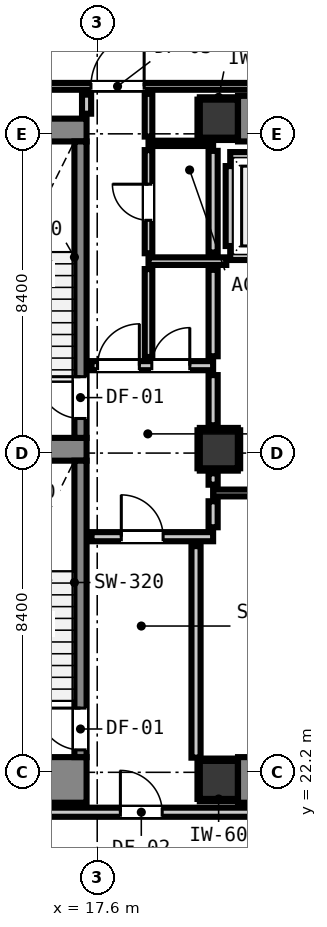
"""IFC4 building model, lengths in metres.
Left out: names, types, materials, properties, quantities, classifications, styles, units other than length and angle.
Written with IfcOpenShell. Run it as: python <this file> out.ifc"""

import sys

from ifc_helpers import new_model, si_unit, direction, frame, frame_2d, origin, origin_2d, place, context, subcontext, project, spatial, rectangle, extrude, element, fill, save


model = new_model("IFC4")
c1 = context("Model", 3, precision=1e-05, world=origin(), true_north=direction((0.0, 1.0)))
c2 = subcontext(c1, "Body", "Model", "MODEL_VIEW")
j1 = project(units=[si_unit("LENGTHUNIT", "METRE"), si_unit("PLANEANGLEUNIT", "RADIAN")], contexts=[c1])
p1 = place(None, origin())
s1 = spatial("IfcSite", under=j1, at=p1, CompositionType="ELEMENT")
p2 = place(p1, origin())
s2 = spatial("IfcBuilding", under=s1, at=p2, CompositionType="ELEMENT")
p3 = place(p2, frame((0.0, 0.0, 17.8)))
s3 = spatial("IfcBuildingStorey", under=s2, at=p3, CompositionType="ELEMENT", Elevation=17.8)
for number, where, z_axis, x_axis in (
    (1, (20.8, 22.0, 0.0), (0.0, 0.0, 1.0), (1.0, 0.0, 0.0)),
    (2, (20.8, 39.4, 0.0), (0.0, 0.0, 1.0), (1.0, 0.0, 0.0)),
):
    element("IfcColumn", number, at=place(p3, frame(where, z_axis=z_axis, x_axis=x_axis)), inside=s3, PredefinedType="COLUMN", context=c2, shape_type="SweptSolid", body=[
        extrude(rectangle(XDim=1.0, YDim=1.0, at=origin_2d()), origin(), (0.0, 0.0, 1.0), 4.2),
    ])
p4 = place(p3, frame((13.24, 22.0, 0.0), z_axis=(0.0, 0.0, 1.0), x_axis=(1.0, 0.0, 0.0)))
e3 = element("IfcWall", 3, at=p4, inside=s3, PredefinedType="SHEAR", context=c2, shape_type="SweptSolid", body=[
    extrude(rectangle(XDim=4.08, YDim=1.2, at=frame_2d((2.04, 0.0))), origin(), (0.0, 0.0, 1.0), 4.2),
])
p5 = place(p3, frame((13.24, 39.1, 0.0), z_axis=(0.0, 0.0, 1.0), x_axis=(1.0, 0.0, 0.0)))
e4 = element("IfcWall", 4, at=p5, inside=s3, PredefinedType="SHEAR", context=c2, shape_type="SweptSolid", body=[
    extrude(rectangle(XDim=4.08, YDim=0.6, at=frame_2d((2.04, 0.0))), origin(), (0.0, 0.0, 1.0), 4.2),
])
p6 = place(p3, frame((13.905, 30.7, 0.0), z_axis=(0.0, 0.0, 1.0), x_axis=(1.0, 0.0, 0.0)))
e5 = element("IfcWall", 5, at=p6, inside=s3, PredefinedType="SHEAR", context=c2, shape_type="SweptSolid", body=[
    extrude(rectangle(XDim=3.415, YDim=0.6, at=frame_2d((1.708, 0.0))), origin(), (0.0, 0.0, 1.0), 4.2),
])
for number, where, z_axis, x_axis in (
    (6, (21.305, 22.0, 0.0), (0.0, 0.0, 1.0), (1.0, 0.0, 0.0)),
    (7, (21.305, 39.4, 0.0), (0.0, 0.0, 1.0), (1.0, 0.0, 0.0)),
):
    element("IfcWall", number, at=place(p3, frame(where, z_axis=z_axis, x_axis=x_axis)), inside=s3, PredefinedType="SHEAR", context=c2, shape_type="SweptSolid", body=[
        extrude(rectangle(XDim=7.39, YDim=1.2, at=frame_2d((3.695, 0.0))), origin(), (0.0, 0.0, 1.0), 4.2),
    ])
p7 = place(p3, frame((17.16, 31.0, 0.0), z_axis=(0.0, 0.0, 1.0), x_axis=(0.0, 1.0, 0.0)))
e8 = element("IfcWall", 8, at=p7, inside=s3, PredefinedType="SHEAR", context=c2, shape_type="SweptSolid", body=[
    extrude(rectangle(XDim=7.8, YDim=0.32, at=frame_2d((3.9, 0.0))), origin(), (0.0, 0.0, 1.0), 4.2),
])
p8 = place(p7, frame((0.51, 0.0, 0.0)))
e9 = element("IfcOpeningElement", 9, at=p8, cuts=e8, PredefinedType="OPENING", context=c2, shape_type="SweptSolid", body=[
    extrude(rectangle(XDim=1.1, YDim=2.15, at=frame_2d((0.55, 1.075))), frame((0.0, 0.17, 0.0), z_axis=(0.0, -1.0, 0.0), x_axis=(1.0, 0.0, 0.0)), (0.0, 0.0, 1.0), 0.34),
])
p9 = place(p3, frame((17.16, 22.6, 0.0), z_axis=(0.0, 0.0, 1.0), x_axis=(0.0, 1.0, 0.0)))
e10 = element("IfcWall", 10, at=p9, inside=s3, PredefinedType="SHEAR", context=c2, shape_type="SweptSolid", body=[
    extrude(rectangle(XDim=7.8, YDim=0.32, at=frame_2d((3.9, 0.0))), origin(), (0.0, 0.0, 1.0), 4.2),
])
p10 = place(p9, frame((0.19, 0.0, 0.0)))
e11 = element("IfcOpeningElement", 11, at=p10, cuts=e10, PredefinedType="OPENING", context=c2, shape_type="SweptSolid", body=[
    extrude(rectangle(XDim=1.1, YDim=2.15, at=frame_2d((0.55, 1.075))), frame((0.0, 0.17, 0.0), z_axis=(0.0, -1.0, 0.0), x_axis=(1.0, 0.0, 0.0)), (0.0, 0.0, 1.0), 0.34),
])
p11 = place(p3, frame((20.8, 30.7, 0.0), z_axis=(0.0, 0.0, 1.0), x_axis=(1.0, 0.0, 0.0)))
e12 = element("IfcColumn", 12, at=p11, inside=s3, PredefinedType="COLUMN", context=c2, shape_type="SweptSolid", body=[
    extrude(rectangle(XDim=1.0, YDim=1.0, at=origin_2d()), origin(), (0.0, 0.0, 1.0), 4.2),
])
for number, where, z_axis, x_axis in (
    (13, (21.1, 35.8, 0.0), (0.0, 0.0, 1.0), (1.0, 0.0, 0.0)),
    (14, (21.1, 38.4, 0.0), (0.0, 0.0, 1.0), (1.0, 0.0, 0.0)),
):
    element("IfcWall", number, at=place(p3, frame(where, z_axis=z_axis, x_axis=x_axis)), inside=s3, PredefinedType="PARTITIONING", context=c2, shape_type="SweptSolid", body=[
        extrude(rectangle(XDim=2.2, YDim=0.24, at=frame_2d((1.1, 0.0))), origin(), (0.0, 0.0, 1.0), 3.78),
    ])
p12 = place(p3, frame((21.1, 36.048, 0.0), z_axis=(0.0, 0.0, 1.0), x_axis=(0.0, 1.0, 0.0)))
e15 = element("IfcWall", 15, at=p12, inside=s3, PredefinedType="PARTITIONING", context=c2, shape_type="SweptSolid", body=[
    extrude(rectangle(XDim=2.104, YDim=0.24, at=frame_2d((1.052, 0.0))), origin(), (0.0, 0.0, 1.0), 1.785),
])
p13 = place(p3, frame((10.5, 21.15, 0.0), z_axis=(0.0, 0.0, 1.0), x_axis=(1.0, 0.0, 0.0)))
e16 = element("IfcWall", 16, at=p13, inside=s3, PredefinedType="PARTITIONING", context=c2, shape_type="SweptSolid", body=[
    extrude(rectangle(XDim=28.7, YDim=0.24, at=frame_2d((14.35, 0.0))), origin(), (0.0, 0.0, 1.0), 3.78),
])
p14 = place(p13, frame((7.71, 0.0, 0.0)))
e17 = element("IfcOpeningElement", 17, at=p14, cuts=e16, PredefinedType="OPENING", context=c2, shape_type="SweptSolid", body=[
    extrude(rectangle(XDim=1.1, YDim=2.15, at=frame_2d((0.55, 1.075))), frame((0.0, 0.13, 0.0), z_axis=(0.0, -1.0, 0.0), x_axis=(1.0, 0.0, 0.0)), (0.0, 0.0, 1.0), 0.26),
])
p15 = place(p13, frame((0.324, 0.0, 0.0)))
e18 = element("IfcOpeningElement", 18, at=p15, cuts=e16, PredefinedType="OPENING", context=c2, shape_type="SweptSolid", body=[
    extrude(rectangle(XDim=1.4, YDim=2.15, at=frame_2d((0.7, 1.075))), frame((0.0, 0.13, 0.0), z_axis=(0.0, -1.0, 0.0), x_axis=(1.0, 0.0, 0.0)), (0.0, 0.0, 1.0), 0.26),
])
p16 = place(p13, frame((27.026, 0.0, 0.0)))
e19 = element("IfcOpeningElement", 19, at=p16, cuts=e16, PredefinedType="OPENING", context=c2, shape_type="SweptSolid", body=[
    extrude(rectangle(XDim=1.4, YDim=2.15, at=frame_2d((0.7, 1.075))), frame((0.0, 0.13, 0.0), z_axis=(0.0, -1.0, 0.0), x_axis=(1.0, 0.0, 0.0)), (0.0, 0.0, 1.0), 0.26),
])
p17 = place(p3, frame((17.45, 28.4, 0.0), z_axis=(0.0, 0.0, 1.0), x_axis=(1.0, 0.0, 0.0)))
e20 = element("IfcWall", 20, at=p17, inside=s3, PredefinedType="PARTITIONING", context=c2, shape_type="SweptSolid", body=[
    extrude(rectangle(XDim=3.2, YDim=0.24, at=frame_2d((1.6, 0.0))), origin(), (0.0, 0.0, 1.0), 3.78),
])
p18 = place(p17, frame((0.784, 0.0, 0.0)))
e21 = element("IfcOpeningElement", 21, at=p18, cuts=e20, PredefinedType="OPENING", context=c2, shape_type="SweptSolid", body=[
    extrude(rectangle(XDim=1.1, YDim=2.15, at=frame_2d((0.55, 1.075))), frame((0.0, 0.13, 0.0), z_axis=(0.0, -1.0, 0.0), x_axis=(1.0, 0.0, 0.0)), (0.0, 0.0, 1.0), 0.26),
])
p19 = place(p3, frame((17.45, 32.9, 0.0), z_axis=(0.0, 0.0, 1.0), x_axis=(1.0, 0.0, 0.0)))
e22 = element("IfcWall", 22, at=p19, inside=s3, PredefinedType="PARTITIONING", context=c2, shape_type="SweptSolid", body=[
    extrude(rectangle(XDim=3.2, YDim=0.24, at=frame_2d((1.6, 0.0))), origin(), (0.0, 0.0, 1.0), 3.78),
])
p20 = place(p19, frame((0.159, 0.0, 0.0)))
e23 = element("IfcOpeningElement", 23, at=p20, cuts=e22, PredefinedType="OPENING", context=c2, shape_type="SweptSolid", body=[
    extrude(rectangle(XDim=1.1, YDim=2.15, at=frame_2d((0.55, 1.075))), frame((0.0, 0.13, 0.0), z_axis=(0.0, -1.0, 0.0), x_axis=(1.0, 0.0, 0.0)), (0.0, 0.0, 1.0), 0.26),
])
p21 = place(p19, frame((1.586, 0.0, 0.0)))
e24 = element("IfcOpeningElement", 24, at=p21, cuts=e22, PredefinedType="OPENING", context=c2, shape_type="SweptSolid", body=[
    extrude(rectangle(XDim=1.0, YDim=2.15, at=frame_2d((0.5, 1.075))), frame((0.0, 0.13, 0.0), z_axis=(0.0, -1.0, 0.0), x_axis=(1.0, 0.0, 0.0)), (0.0, 0.0, 1.0), 0.26),
])
p22 = place(p3, frame((18.95, 35.65, 0.0), z_axis=(0.0, 0.0, 1.0), x_axis=(1.0, 0.0, 0.0)))
e25 = element("IfcWall", 25, at=p22, inside=s3, PredefinedType="PARTITIONING", context=c2, shape_type="SweptSolid", body=[
    extrude(rectangle(XDim=2.046, YDim=0.2, at=frame_2d((1.023, 0.0))), origin(), (0.0, 0.0, 1.0), 3.78),
])
p23 = place(p3, frame((20.65, 29.55, 0.0), z_axis=(0.0, 0.0, 1.0), x_axis=(1.0, 0.0, 0.0)))
e26 = element("IfcWall", 26, at=p23, inside=s3, PredefinedType="PARTITIONING", context=c2, shape_type="SweptSolid", body=[
    extrude(rectangle(XDim=9.325, YDim=0.18, at=frame_2d((4.663, 0.0))), origin(), (0.0, 0.0, 1.0), 3.78),
])
p24 = place(p3, frame((10.5, 40.25, 0.0), z_axis=(0.0, 0.0, 1.0), x_axis=(1.0, 0.0, 0.0)))
e27 = element("IfcWall", 27, at=p24, inside=s3, PredefinedType="PARTITIONING", context=c2, shape_type="SweptSolid", body=[
    extrude(rectangle(XDim=37.2, YDim=0.18, at=frame_2d((18.6, 0.0))), origin(), (0.0, 0.0, 1.0), 3.78),
])
p25 = place(p24, frame((6.935, 0.0, 0.0)))
e28 = element("IfcOpeningElement", 28, at=p25, cuts=e27, PredefinedType="OPENING", context=c2, shape_type="SweptSolid", body=[
    extrude(rectangle(XDim=1.4, YDim=2.15, at=frame_2d((0.7, 1.075))), frame((0.0, 0.1, 0.0), z_axis=(0.0, -1.0, 0.0), x_axis=(1.0, 0.0, 0.0)), (0.0, 0.0, 1.0), 0.2),
])
p26 = place(p24, frame((0.324, 0.0, 0.0)))
e29 = element("IfcOpeningElement", 29, at=p26, cuts=e27, PredefinedType="OPENING", context=c2, shape_type="SweptSolid", body=[
    extrude(rectangle(XDim=1.4, YDim=2.15, at=frame_2d((0.7, 1.075))), frame((0.0, 0.1, 0.0), z_axis=(0.0, -1.0, 0.0), x_axis=(1.0, 0.0, 0.0)), (0.0, 0.0, 1.0), 0.2),
])
p27 = place(p24, frame((27.05, 0.0, 0.0)))
e30 = element("IfcOpeningElement", 30, at=p27, cuts=e27, PredefinedType="OPENING", context=c2, shape_type="SweptSolid", body=[
    extrude(rectangle(XDim=1.4, YDim=2.15, at=frame_2d((0.7, 1.075))), frame((0.0, 0.1, 0.0), z_axis=(0.0, -1.0, 0.0), x_axis=(1.0, 0.0, 0.0)), (0.0, 0.0, 1.0), 0.2),
])
p28 = place(p3, frame((18.95, 38.75, 0.0), z_axis=(0.0, 0.0, 1.0), x_axis=(1.0, 0.0, 0.0)))
e31 = element("IfcWall", 31, at=p28, inside=s3, PredefinedType="PARTITIONING", context=c2, shape_type="SweptSolid", body=[
    extrude(rectangle(XDim=1.7, YDim=0.14, at=frame_2d((0.85, 0.0))), origin(), (0.0, 0.0, 1.0), 1.785),
])
p29 = place(p3, frame((17.32, 39.53, 0.0), z_axis=(0.0, 0.0, 1.0), x_axis=(0.0, 1.0, 0.0)))
e32 = element("IfcWall", 32, at=p29, inside=s3, PredefinedType="PARTITIONING", context=c2, shape_type="SweptSolid", body=[
    extrude(rectangle(XDim=0.502, YDim=0.24, at=frame_2d((0.251, 0.0))), origin(), (0.0, 0.0, 1.0), 3.78),
])
p30 = place(p3, frame((20.2, 22.586, 0.0), z_axis=(0.0, 0.0, 1.0), x_axis=(0.0, 1.0, 0.0)))
e33 = element("IfcWall", 33, at=p30, inside=s3, PredefinedType="PARTITIONING", context=c2, shape_type="SweptSolid", body=[
    extrude(rectangle(XDim=5.566, YDim=0.24, at=frame_2d((2.783, 0.0))), origin(), (0.0, 0.0, 1.0), 1.785),
])
p31 = place(p3, frame((20.65, 28.648, 0.0), z_axis=(0.0, 0.0, 1.0), x_axis=(0.0, 1.0, 0.0)))
e34 = element("IfcWall", 34, at=p31, inside=s3, PredefinedType="PARTITIONING", context=c2, shape_type="SweptSolid", body=[
    extrude(rectangle(XDim=0.684, YDim=0.24, at=frame_2d((0.342, 0.0))), origin(), (0.0, 0.0, 1.0), 1.785),
])
p32 = place(p3, frame((20.65, 29.768, 0.0), z_axis=(0.0, 0.0, 1.0), x_axis=(0.0, 1.0, 0.0)))
e35 = element("IfcWall", 35, at=p32, inside=s3, PredefinedType="PARTITIONING", context=c2, shape_type="SweptSolid", body=[
    extrude(rectangle(XDim=0.3, YDim=0.24, at=frame_2d((0.15, 0.0))), origin(), (0.0, 0.0, 1.0), 1.785),
])
p33 = place(p3, frame((20.65, 31.332, 0.0), z_axis=(0.0, 0.0, 1.0), x_axis=(0.0, 1.0, 0.0)))
e36 = element("IfcWall", 36, at=p33, inside=s3, PredefinedType="PARTITIONING", context=c2, shape_type="SweptSolid", body=[
    extrude(rectangle(XDim=1.32, YDim=0.24, at=frame_2d((0.66, 0.0))), origin(), (0.0, 0.0, 1.0), 1.785),
])
p34 = place(p3, frame((20.65, 33.148, 0.0), z_axis=(0.0, 0.0, 1.0), x_axis=(0.0, 1.0, 0.0)))
e37 = element("IfcWall", 37, at=p34, inside=s3, PredefinedType="PARTITIONING", context=c2, shape_type="SweptSolid", body=[
    extrude(rectangle(XDim=2.274, YDim=0.24, at=frame_2d((1.137, 0.0))), origin(), (0.0, 0.0, 1.0), 1.785),
])
p35 = place(p3, frame((20.65, 35.878, 0.0), z_axis=(0.0, 0.0, 1.0), x_axis=(0.0, 1.0, 0.0)))
e38 = element("IfcWall", 38, at=p35, inside=s3, PredefinedType="PARTITIONING", context=c2, shape_type="SweptSolid", body=[
    extrude(rectangle(XDim=2.674, YDim=0.24, at=frame_2d((1.337, 0.0))), origin(), (0.0, 0.0, 1.0), 1.785),
])
p36 = place(p3, frame((18.95, 33.128, 0.0), z_axis=(0.0, 0.0, 1.0), x_axis=(0.0, 1.0, 0.0)))
e39 = element("IfcWall", 39, at=p36, inside=s3, PredefinedType="PARTITIONING", context=c2, shape_type="SweptSolid", body=[
    extrude(rectangle(XDim=2.314, YDim=0.2, at=frame_2d((1.157, 0.0))), origin(), (0.0, 0.0, 1.0), 3.78),
])
p37 = place(p3, frame((18.95, 35.858, 0.0), z_axis=(0.0, 0.0, 1.0), x_axis=(0.0, 1.0, 0.0)))
e40 = element("IfcWall", 40, at=p37, inside=s3, PredefinedType="PARTITIONING", context=c2, shape_type="SweptSolid", body=[
    extrude(rectangle(XDim=2.714, YDim=0.2, at=frame_2d((1.357, 0.0))), origin(), (0.0, 0.0, 1.0), 3.78),
])
p38 = place(p37, frame((0.867, 0.0, 0.0)))
e41 = element("IfcOpeningElement", 41, at=p38, cuts=e40, PredefinedType="OPENING", context=c2, shape_type="SweptSolid", body=[
    extrude(rectangle(XDim=0.95, YDim=2.1, at=frame_2d((0.475, 1.05))), frame((0.0, 0.11, 0.0), z_axis=(0.0, -1.0, 0.0), x_axis=(1.0, 0.0, 0.0)), (0.0, 0.0, 1.0), 0.22),
])
p39 = place(p3, frame((18.95, 38.928, 0.0), z_axis=(0.0, 0.0, 1.0), x_axis=(0.0, 1.0, 0.0)))
e42 = element("IfcWall", 42, at=p39, inside=s3, PredefinedType="PARTITIONING", context=c2, shape_type="SweptSolid", body=[
    extrude(rectangle(XDim=1.124, YDim=0.2, at=frame_2d((0.562, 0.0))), origin(), (0.0, 0.0, 1.0), 3.78),
])
for number, where, z_axis, x_axis in (
    (43, (20.3, 21.468, 0.0), (0.0, 0.0, 1.0), (1.0, 0.0, 0.0)),
    (44, (20.3, 22.532, 0.0), (0.0, 0.0, 1.0), (1.0, 0.0, 0.0)),
):
    element("IfcWall", number, at=place(p3, frame(where, z_axis=z_axis, x_axis=x_axis)), inside=s3, PredefinedType="PARTITIONING", context=c2, shape_type="SweptSolid", body=[
        extrude(rectangle(XDim=0.99, YDim=0.06, at=frame_2d((0.495, 0.0))), origin(), (0.0, 0.0, 1.0), 1.45),
    ])
p40 = place(p3, frame((20.268, 21.5, 0.0), z_axis=(0.0, 0.0, 1.0), x_axis=(0.0, 1.0, 0.0)))
e45 = element("IfcWall", 45, at=p40, inside=s3, PredefinedType="PARTITIONING", context=c2, shape_type="SweptSolid", body=[
    extrude(rectangle(XDim=1.0, YDim=0.06, at=frame_2d((0.5, 0.0))), origin(), (0.0, 0.0, 1.0), 1.45),
])
for number, where, z_axis, x_axis in (
    (46, (20.3, 38.868, 0.0), (0.0, 0.0, 1.0), (1.0, 0.0, 0.0)),
    (47, (20.3, 39.932, 0.0), (0.0, 0.0, 1.0), (1.0, 0.0, 0.0)),
):
    element("IfcWall", number, at=place(p3, frame(where, z_axis=z_axis, x_axis=x_axis)), inside=s3, PredefinedType="PARTITIONING", context=c2, shape_type="SweptSolid", body=[
        extrude(rectangle(XDim=0.99, YDim=0.06, at=frame_2d((0.495, 0.0))), origin(), (0.0, 0.0, 1.0), 1.45),
    ])
for number, where, z_axis, x_axis in (
    (48, (20.268, 38.9, 0.0), (0.0, 0.0, 1.0), (0.0, 1.0, 0.0)),
    (49, (20.3, 30.168, 0.0), (0.0, 0.0, 1.0), (1.0, 0.0, 0.0)),
    (50, (20.3, 31.232, 0.0), (0.0, 0.0, 1.0), (1.0, 0.0, 0.0)),
    (51, (20.268, 30.2, 0.0), (0.0, 0.0, 1.0), (0.0, 1.0, 0.0)),
    (52, (21.332, 30.2, 0.0), (0.0, 0.0, 1.0), (0.0, 1.0, 0.0)),
):
    element("IfcWall", number, at=place(p3, frame(where, z_axis=z_axis, x_axis=x_axis)), inside=s3, PredefinedType="PARTITIONING", context=c2, shape_type="SweptSolid", body=[
        extrude(rectangle(XDim=1.0, YDim=0.06, at=frame_2d((0.5, 0.0))), origin(), (0.0, 0.0, 1.0), 1.45),
    ])
p41 = place(p8, origin())
e53 = element("IfcDoor", 53, at=p41, inside=s3, OperationType="SINGLE_SWING_RIGHT", PredefinedType="DOOR", context=c2, shape_type="SweptSolid", body=[
    extrude(rectangle(XDim=1.1, YDim=2.15, at=frame_2d((0.55, 1.075))), frame((0.0, 0.025, 0.0), z_axis=(0.0, -1.0, 0.0), x_axis=(1.0, 0.0, 0.0)), (0.0, 0.0, 1.0), 0.05),
])
fill(e9, e53)
p42 = place(p10, origin())
e54 = element("IfcDoor", 54, at=p42, inside=s3, OperationType="SINGLE_SWING_RIGHT", PredefinedType="DOOR", context=c2, shape_type="SweptSolid", body=[
    extrude(rectangle(XDim=1.1, YDim=2.15, at=frame_2d((0.55, 1.075))), frame((0.0, 0.025, 0.0), z_axis=(0.0, -1.0, 0.0), x_axis=(1.0, 0.0, 0.0)), (0.0, 0.0, 1.0), 0.05),
])
fill(e11, e54)
p43 = place(p18, origin())
e55 = element("IfcDoor", 55, at=p43, inside=s3, OperationType="SINGLE_SWING_LEFT", PredefinedType="DOOR", context=c2, shape_type="SweptSolid", body=[
    extrude(rectangle(XDim=1.1, YDim=2.15, at=frame_2d((0.55, 1.075))), frame((0.0, 0.025, 0.0), z_axis=(0.0, -1.0, 0.0), x_axis=(1.0, 0.0, 0.0)), (0.0, 0.0, 1.0), 0.05),
])
fill(e21, e55)
p44 = place(p20, origin())
e56 = element("IfcDoor", 56, at=p44, inside=s3, OperationType="SINGLE_SWING_RIGHT", PredefinedType="DOOR", context=c2, shape_type="SweptSolid", body=[
    extrude(rectangle(XDim=1.1, YDim=2.15, at=frame_2d((0.55, 1.075))), frame((0.0, 0.025, 0.0), z_axis=(0.0, -1.0, 0.0), x_axis=(1.0, 0.0, 0.0)), (0.0, 0.0, 1.0), 0.05),
])
fill(e23, e56)
p45 = place(p14, origin())
e57 = element("IfcDoor", 57, at=p45, inside=s3, OperationType="SINGLE_SWING_LEFT", PredefinedType="DOOR", context=c2, shape_type="SweptSolid", body=[
    extrude(rectangle(XDim=1.1, YDim=2.15, at=frame_2d((0.55, 1.075))), frame((0.0, 0.025, 0.0), z_axis=(0.0, -1.0, 0.0), x_axis=(1.0, 0.0, 0.0)), (0.0, 0.0, 1.0), 0.05),
])
fill(e17, e57)
p46 = place(p25, origin())
e58 = element("IfcDoor", 58, at=p46, inside=s3, OperationType="SINGLE_SWING_RIGHT", PredefinedType="DOOR", context=c2, shape_type="SweptSolid", body=[
    extrude(rectangle(XDim=1.4, YDim=2.15, at=frame_2d((0.7, 1.075))), frame((0.0, 0.025, 0.0), z_axis=(0.0, -1.0, 0.0), x_axis=(1.0, 0.0, 0.0)), (0.0, 0.0, 1.0), 0.05),
])
fill(e28, e58)
p47 = place(p21, origin())
e59 = element("IfcDoor", 59, at=p47, inside=s3, OperationType="SINGLE_SWING_RIGHT", PredefinedType="DOOR", context=c2, shape_type="SweptSolid", body=[
    extrude(rectangle(XDim=1.0, YDim=2.15, at=frame_2d((0.5, 1.075))), frame((0.0, 0.025, 0.0), z_axis=(0.0, -1.0, 0.0), x_axis=(1.0, 0.0, 0.0)), (0.0, 0.0, 1.0), 0.05),
])
fill(e24, e59)
p48 = place(p38, origin())
e60 = element("IfcDoor", 60, at=p48, inside=s3, OperationType="SINGLE_SWING_RIGHT", PredefinedType="DOOR", context=c2, shape_type="SweptSolid", body=[
    extrude(rectangle(XDim=0.95, YDim=2.1, at=frame_2d((0.475, 1.05))), frame((0.0, 0.025, 0.0), z_axis=(0.0, -1.0, 0.0), x_axis=(1.0, 0.0, 0.0)), (0.0, 0.0, 1.0), 0.05),
])
fill(e41, e60)
save(model, sys.argv[1])
